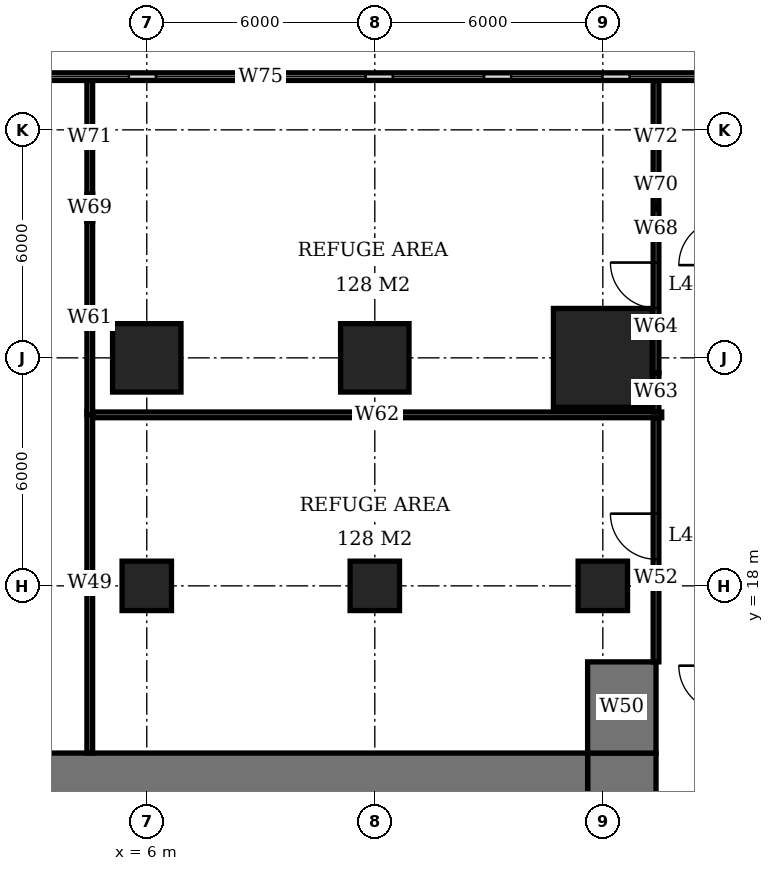
"""IFC4 building model, lengths in metres.
Left out: names, types, materials, properties, quantities, classifications, styles, units other than length and angle.
Written with IfcOpenShell. Run it as: python <this file> out.ifc"""

import sys

from ifc_helpers import new_model, si_unit, direction, frame, frame_2d, origin, origin_2d, place, context, subcontext, project, spatial, rectangle, extrude, element, fill, save


model = new_model("IFC4")
c1 = context("Model", 3, precision=1e-05, world=origin(), true_north=direction((0.0, 1.0)))
c2 = subcontext(c1, "Body", "Model", "MODEL_VIEW")
j1 = project(units=[si_unit("LENGTHUNIT", "METRE"), si_unit("PLANEANGLEUNIT", "RADIAN")], contexts=[c1])
p1 = place(None, origin())
s1 = spatial("IfcSite", under=j1, at=p1, CompositionType="ELEMENT")
p2 = place(p1, origin())
s2 = spatial("IfcBuilding", under=s1, at=p2, CompositionType="ELEMENT")
p3 = place(p2, frame((0.0, 0.0, 164.0)))
s3 = spatial("IfcBuildingStorey", under=s2, at=p3, CompositionType="ELEMENT", Elevation=164.0)
p4 = place(p3, frame((6.0, 18.0, 0.0), z_axis=(0.0, 0.0, 1.0), x_axis=(1.0, 0.0, 0.0)))
e1 = element("IfcColumn", 1, at=p4, inside=s3, PredefinedType="COLUMN", context=c2, shape_type="SweptSolid", body=[
    extrude(rectangle(XDim=1.3, YDim=1.3, at=origin_2d()), origin(), (0.0, 0.0, 1.0), 5.4),
])
p5 = place(p3, frame((6.0, 24.0, 0.0), z_axis=(0.0, 0.0, 1.0), x_axis=(1.0, 0.0, 0.0)))
e2 = element("IfcColumn", 2, at=p5, inside=s3, PredefinedType="COLUMN", context=c2, shape_type="SweptSolid", body=[
    extrude(rectangle(XDim=1.8, YDim=1.8, at=origin_2d()), origin(), (0.0, 0.0, 1.0), 5.4),
])
p6 = place(p3, frame((12.0, 18.0, 0.0), z_axis=(0.0, 0.0, 1.0), x_axis=(1.0, 0.0, 0.0)))
e3 = element("IfcColumn", 3, at=p6, inside=s3, PredefinedType="COLUMN", context=c2, shape_type="SweptSolid", body=[
    extrude(rectangle(XDim=1.3, YDim=1.3, at=origin_2d()), origin(), (0.0, 0.0, 1.0), 5.4),
])
p7 = place(p3, frame((12.0, 24.0, 0.0), z_axis=(0.0, 0.0, 1.0), x_axis=(1.0, 0.0, 0.0)))
e4 = element("IfcColumn", 4, at=p7, inside=s3, PredefinedType="COLUMN", context=c2, shape_type="SweptSolid", body=[
    extrude(rectangle(XDim=1.8, YDim=1.8, at=origin_2d()), origin(), (0.0, 0.0, 1.0), 5.4),
])
p8 = place(p3, frame((18.0, 18.0, 0.0), z_axis=(0.0, 0.0, 1.0), x_axis=(1.0, 0.0, 0.0)))
e5 = element("IfcColumn", 5, at=p8, inside=s3, PredefinedType="COLUMN", context=c2, shape_type="SweptSolid", body=[
    extrude(rectangle(XDim=1.3, YDim=1.3, at=origin_2d()), origin(), (0.0, 0.0, 1.0), 5.4),
])
p9 = place(p3, frame((18.0, 24.0, 0.0), z_axis=(0.0, 0.0, 1.0), x_axis=(1.0, 0.0, 0.0)))
e6 = element("IfcColumn", 6, at=p9, inside=s3, PredefinedType="COLUMN", context=c2, shape_type="SweptSolid", body=[
    extrude(rectangle(XDim=2.6, YDim=2.6, at=origin_2d()), origin(), (0.0, 0.0, 1.0), 5.4),
])
p10 = place(p3, frame((-5.6, 12.6, 0.0), z_axis=(0.0, 0.0, 1.0), x_axis=(1.0, 0.0, 0.0)))
e7 = element("IfcWall", 7, at=p10, inside=s3, PredefinedType="SHEAR", context=c2, shape_type="SweptSolid", body=[
    extrude(rectangle(XDim=23.2, YDim=2.0, at=frame_2d((11.6, 0.0))), origin(), (0.0, 0.0, 1.0), 5.4),
])
p11 = place(p3, frame((18.5, -7.6, 0.0), z_axis=(0.0, 0.0, 1.0), x_axis=(0.0, 1.0, 0.0)))
e8 = element("IfcWall", 8, at=p11, inside=s3, PredefinedType="SHEAR", context=c2, shape_type="SweptSolid", body=[
    extrude(rectangle(XDim=21.2, YDim=1.8, at=frame_2d((10.6, 0.0))), origin(), (0.0, 0.0, 1.0), 5.4),
])
p12 = place(p11, frame((9.2, 0.0, 0.0)))
e9 = element("IfcOpeningElement", 9, at=p12, cuts=e8, PredefinedType="OPENING", context=c2, shape_type="SweptSolid", body=[
    extrude(rectangle(XDim=1.8, YDim=2.4, at=frame_2d((0.9, 1.2))), frame((0.0, 0.91, 0.0), z_axis=(0.0, -1.0, 0.0), x_axis=(1.0, 0.0, 0.0)), (0.0, 0.0, 1.0), 1.82),
])
p13 = place(p3, frame((18.5, 13.6, 0.0), z_axis=(0.0, 0.0, 1.0), x_axis=(0.0, 1.0, 0.0)))
e10 = element("IfcWall", 10, at=p13, inside=s3, PredefinedType="SHEAR", context=c2, shape_type="SweptSolid", body=[
    extrude(rectangle(XDim=2.4, YDim=1.8, at=frame_2d((1.2, 0.0))), origin(), (0.0, 0.0, 1.0), 5.4),
])
p14 = place(p3, frame((24.58, 31.4, 0.0), z_axis=(0.0, 0.0, 1.0), x_axis=(-1.0, 0.0, 0.0)))
e11 = element("IfcWall", 11, at=p14, inside=s3, PredefinedType="USERDEFINED", context=c2, shape_type="SweptSolid", body=[
    extrude(rectangle(XDim=31.16, YDim=0.2, at=frame_2d((15.58, 0.0))), origin(), (0.0, 0.0, 1.0), 5.4),
])
p15 = place(p14, frame((0.358, 0.0, 0.6)))
e12 = element("IfcOpeningElement", 12, at=p15, cuts=e11, PredefinedType="OPENING", context=c2, shape_type="SweptSolid", body=[
    extrude(rectangle(XDim=2.4, YDim=3.0, at=frame_2d((1.2, 1.5))), frame((0.0, 0.11, 0.0), z_axis=(0.0, -1.0, 0.0), x_axis=(1.0, 0.0, 0.0)), (0.0, 0.0, 1.0), 0.22),
])
p16 = place(p14, frame((3.474, 0.0, 0.6)))
e13 = element("IfcOpeningElement", 13, at=p16, cuts=e11, PredefinedType="OPENING", context=c2, shape_type="SweptSolid", body=[
    extrude(rectangle(XDim=2.4, YDim=3.0, at=frame_2d((1.2, 1.5))), frame((0.0, 0.11, 0.0), z_axis=(0.0, -1.0, 0.0), x_axis=(1.0, 0.0, 0.0)), (0.0, 0.0, 1.0), 0.22),
])
p17 = place(p14, frame((6.59, 0.0, 0.6)))
e14 = element("IfcOpeningElement", 14, at=p17, cuts=e11, PredefinedType="OPENING", context=c2, shape_type="SweptSolid", body=[
    extrude(rectangle(XDim=2.4, YDim=3.0, at=frame_2d((1.2, 1.5))), frame((0.0, 0.11, 0.0), z_axis=(0.0, -1.0, 0.0), x_axis=(1.0, 0.0, 0.0)), (0.0, 0.0, 1.0), 0.22),
])
p18 = place(p14, frame((9.706, 0.0, 0.6)))
e15 = element("IfcOpeningElement", 15, at=p18, cuts=e11, PredefinedType="OPENING", context=c2, shape_type="SweptSolid", body=[
    extrude(rectangle(XDim=2.4, YDim=3.0, at=frame_2d((1.2, 1.5))), frame((0.0, 0.11, 0.0), z_axis=(0.0, -1.0, 0.0), x_axis=(1.0, 0.0, 0.0)), (0.0, 0.0, 1.0), 0.22),
])
p19 = place(p14, frame((12.822, 0.0, 0.6)))
e16 = element("IfcOpeningElement", 16, at=p19, cuts=e11, PredefinedType="OPENING", context=c2, shape_type="SweptSolid", body=[
    extrude(rectangle(XDim=2.4, YDim=3.0, at=frame_2d((1.2, 1.5))), frame((0.0, 0.11, 0.0), z_axis=(0.0, -1.0, 0.0), x_axis=(1.0, 0.0, 0.0)), (0.0, 0.0, 1.0), 0.22),
])
p20 = place(p14, frame((15.938, 0.0, 0.6)))
e17 = element("IfcOpeningElement", 17, at=p20, cuts=e11, PredefinedType="OPENING", context=c2, shape_type="SweptSolid", body=[
    extrude(rectangle(XDim=2.4, YDim=3.0, at=frame_2d((1.2, 1.5))), frame((0.0, 0.11, 0.0), z_axis=(0.0, -1.0, 0.0), x_axis=(1.0, 0.0, 0.0)), (0.0, 0.0, 1.0), 0.22),
])
p21 = place(p14, frame((19.054, 0.0, 0.6)))
e18 = element("IfcOpeningElement", 18, at=p21, cuts=e11, PredefinedType="OPENING", context=c2, shape_type="SweptSolid", body=[
    extrude(rectangle(XDim=2.4, YDim=3.0, at=frame_2d((1.2, 1.5))), frame((0.0, 0.11, 0.0), z_axis=(0.0, -1.0, 0.0), x_axis=(1.0, 0.0, 0.0)), (0.0, 0.0, 1.0), 0.22),
])
p22 = place(p14, frame((22.17, 0.0, 0.6)))
e19 = element("IfcOpeningElement", 19, at=p22, cuts=e11, PredefinedType="OPENING", context=c2, shape_type="SweptSolid", body=[
    extrude(rectangle(XDim=2.4, YDim=3.0, at=frame_2d((1.2, 1.5))), frame((0.0, 0.11, 0.0), z_axis=(0.0, -1.0, 0.0), x_axis=(1.0, 0.0, 0.0)), (0.0, 0.0, 1.0), 0.22),
])
p23 = place(p14, frame((25.286, 0.0, 0.6)))
e20 = element("IfcOpeningElement", 20, at=p23, cuts=e11, PredefinedType="OPENING", context=c2, shape_type="SweptSolid", body=[
    extrude(rectangle(XDim=2.4, YDim=3.0, at=frame_2d((1.2, 1.5))), frame((0.0, 0.11, 0.0), z_axis=(0.0, -1.0, 0.0), x_axis=(1.0, 0.0, 0.0)), (0.0, 0.0, 1.0), 0.22),
])
p24 = place(p14, frame((28.402, 0.0, 0.6)))
e21 = element("IfcOpeningElement", 21, at=p24, cuts=e11, PredefinedType="OPENING", context=c2, shape_type="SweptSolid", body=[
    extrude(rectangle(XDim=2.4, YDim=3.0, at=frame_2d((1.2, 1.5))), frame((0.0, 0.11, 0.0), z_axis=(0.0, -1.0, 0.0), x_axis=(1.0, 0.0, 0.0)), (0.0, 0.0, 1.0), 0.22),
])
p25 = place(p3, frame((4.5, 13.6, 0.0), z_axis=(0.0, 0.0, 1.0), x_axis=(0.0, 1.0, 0.0)))
e22 = element("IfcWall", 22, at=p25, inside=s3, PredefinedType="PARTITIONING", context=c2, shape_type="SweptSolid", body=[
    extrude(rectangle(XDim=8.975, YDim=0.15, at=frame_2d((4.487, 0.0))), origin(), (0.0, 0.0, 1.0), 5.15),
])
p26 = place(p3, frame((4.5, 22.5, 0.0), z_axis=(0.0, 0.0, 1.0), x_axis=(0.0, 1.0, 0.0)))
e23 = element("IfcWall", 23, at=p26, inside=s3, PredefinedType="PARTITIONING", context=c2, shape_type="SweptSolid", body=[
    extrude(rectangle(XDim=5.09, YDim=0.15, at=frame_2d((2.545, 0.0))), origin(), (0.0, 0.0, 1.0), 5.15),
])
p27 = place(p3, frame((4.5, 27.59, 0.0), z_axis=(0.0, 0.0, 1.0), x_axis=(0.0, 1.0, 0.0)))
e24 = element("IfcWall", 24, at=p27, inside=s3, PredefinedType="PARTITIONING", context=c2, shape_type="SweptSolid", body=[
    extrude(rectangle(XDim=0.72, YDim=0.15, at=frame_2d((0.36, 0.0))), origin(), (0.0, 0.0, 1.0), 4.15),
])
p28 = place(p3, frame((4.5, 28.31, 0.0), z_axis=(0.0, 0.0, 1.0), x_axis=(0.0, 1.0, 0.0)))
e25 = element("IfcWall", 25, at=p28, inside=s3, PredefinedType="PARTITIONING", context=c2, shape_type="SweptSolid", body=[
    extrude(rectangle(XDim=2.99, YDim=0.15, at=frame_2d((1.495, 0.0))), origin(), (0.0, 0.0, 1.0), 5.15),
])
p29 = place(p3, frame((4.575, 22.5, 0.0), z_axis=(0.0, 0.0, 1.0), x_axis=(1.0, 0.0, 0.0)))
e26 = element("IfcWall", 26, at=p29, inside=s3, PredefinedType="PARTITIONING", context=c2, shape_type="SweptSolid", body=[
    extrude(rectangle(XDim=14.975, YDim=0.15, at=frame_2d((7.488, 0.0))), origin(), (0.0, 0.0, 1.0), 5.15),
])
p30 = place(p3, frame((19.4, 16.0, 0.0), z_axis=(0.0, 0.0, 1.0), x_axis=(0.0, 1.0, 0.0)))
e27 = element("IfcWall", 27, at=p30, inside=s3, PredefinedType="PARTITIONING", context=c2, shape_type="SweptSolid", body=[
    extrude(rectangle(XDim=6.425, YDim=0.15, at=frame_2d((3.212, 0.0))), origin(), (0.0, 0.0, 1.0), 5.15),
])
p31 = place(p30, frame((2.7, 0.0, 0.0)))
e28 = element("IfcOpeningElement", 28, at=p31, cuts=e27, PredefinedType="OPENING", context=c2, shape_type="SweptSolid", body=[
    extrude(rectangle(XDim=1.2, YDim=2.4, at=frame_2d((0.6, 1.2))), frame((0.0, 0.085, 0.0), z_axis=(0.0, -1.0, 0.0), x_axis=(1.0, 0.0, 0.0)), (0.0, 0.0, 1.0), 0.17),
])
p32 = place(p3, frame((19.4, 22.575, 0.0), z_axis=(0.0, 0.0, 1.0), x_axis=(0.0, 1.0, 0.0)))
e29 = element("IfcWall", 29, at=p32, inside=s3, PredefinedType="PARTITIONING", context=c2, shape_type="SweptSolid", body=[
    extrude(rectangle(XDim=1.033, YDim=0.15, at=frame_2d((0.517, 0.0))), origin(), (0.0, 0.0, 1.0), 5.15),
])
p33 = place(p3, frame((19.4, 23.608, 0.0), z_axis=(0.0, 0.0, 1.0), x_axis=(0.0, 1.0, 0.0)))
e30 = element("IfcWall", 30, at=p33, inside=s3, PredefinedType="PARTITIONING", context=c2, shape_type="SweptSolid", body=[
    extrude(rectangle(XDim=3.584, YDim=0.15, at=frame_2d((1.792, 0.0))), origin(), (0.0, 0.0, 1.0), 4.15),
])
p34 = place(p33, frame((1.7, 0.0, 0.0)))
e31 = element("IfcOpeningElement", 31, at=p34, cuts=e30, PredefinedType="OPENING", context=c2, shape_type="SweptSolid", body=[
    extrude(rectangle(XDim=1.2, YDim=2.4, at=frame_2d((0.6, 1.2))), frame((0.0, 0.085, 0.0), z_axis=(0.0, -1.0, 0.0), x_axis=(1.0, 0.0, 0.0)), (0.0, 0.0, 1.0), 0.17),
])
p35 = place(p3, frame((19.4, 27.192, 0.0), z_axis=(0.0, 0.0, 1.0), x_axis=(0.0, 1.0, 0.0)))
e32 = element("IfcWall", 32, at=p35, inside=s3, PredefinedType="PARTITIONING", context=c2, shape_type="SweptSolid", body=[
    extrude(rectangle(XDim=0.398, YDim=0.15, at=frame_2d((0.199, 0.0))), origin(), (0.0, 0.0, 1.0), 5.15),
])
p36 = place(p3, frame((19.4, 27.59, 0.0), z_axis=(0.0, 0.0, 1.0), x_axis=(0.0, 1.0, 0.0)))
e33 = element("IfcWall", 33, at=p36, inside=s3, PredefinedType="PARTITIONING", context=c2, shape_type="SweptSolid", body=[
    extrude(rectangle(XDim=0.72, YDim=0.15, at=frame_2d((0.36, 0.0))), origin(), (0.0, 0.0, 1.0), 4.15),
])
p37 = place(p3, frame((19.4, 28.31, 0.0), z_axis=(0.0, 0.0, 1.0), x_axis=(0.0, 1.0, 0.0)))
e34 = element("IfcWall", 34, at=p37, inside=s3, PredefinedType="PARTITIONING", context=c2, shape_type="SweptSolid", body=[
    extrude(rectangle(XDim=2.99, YDim=0.15, at=frame_2d((1.495, 0.0))), origin(), (0.0, 0.0, 1.0), 5.15),
])
p38 = place(p16, origin())
e35 = element("IfcWindow", 35, at=p38, inside=s3, PartitioningType="SINGLE_PANEL", PredefinedType="USERDEFINED", context=c2, shape_type="SweptSolid", body=[
    extrude(rectangle(XDim=2.4, YDim=3.0, at=frame_2d((1.2, 1.5))), frame((0.0, 0.03, 0.0), z_axis=(0.0, -1.0, 0.0), x_axis=(1.0, 0.0, 0.0)), (0.0, 0.0, 1.0), 0.06),
])
fill(e13, e35)
p39 = place(p17, origin())
e36 = element("IfcWindow", 36, at=p39, inside=s3, PartitioningType="SINGLE_PANEL", PredefinedType="USERDEFINED", context=c2, shape_type="SweptSolid", body=[
    extrude(rectangle(XDim=2.4, YDim=3.0, at=frame_2d((1.2, 1.5))), frame((0.0, 0.03, 0.0), z_axis=(0.0, -1.0, 0.0), x_axis=(1.0, 0.0, 0.0)), (0.0, 0.0, 1.0), 0.06),
])
fill(e14, e36)
p40 = place(p18, origin())
e37 = element("IfcWindow", 37, at=p40, inside=s3, PartitioningType="SINGLE_PANEL", PredefinedType="USERDEFINED", context=c2, shape_type="SweptSolid", body=[
    extrude(rectangle(XDim=2.4, YDim=3.0, at=frame_2d((1.2, 1.5))), frame((0.0, 0.03, 0.0), z_axis=(0.0, -1.0, 0.0), x_axis=(1.0, 0.0, 0.0)), (0.0, 0.0, 1.0), 0.06),
])
fill(e15, e37)
p41 = place(p19, origin())
e38 = element("IfcWindow", 38, at=p41, inside=s3, PartitioningType="SINGLE_PANEL", PredefinedType="USERDEFINED", context=c2, shape_type="SweptSolid", body=[
    extrude(rectangle(XDim=2.4, YDim=3.0, at=frame_2d((1.2, 1.5))), frame((0.0, 0.03, 0.0), z_axis=(0.0, -1.0, 0.0), x_axis=(1.0, 0.0, 0.0)), (0.0, 0.0, 1.0), 0.06),
])
fill(e16, e38)
p42 = place(p20, origin())
e39 = element("IfcWindow", 39, at=p42, inside=s3, PartitioningType="SINGLE_PANEL", PredefinedType="USERDEFINED", context=c2, shape_type="SweptSolid", body=[
    extrude(rectangle(XDim=2.4, YDim=3.0, at=frame_2d((1.2, 1.5))), frame((0.0, 0.03, 0.0), z_axis=(0.0, -1.0, 0.0), x_axis=(1.0, 0.0, 0.0)), (0.0, 0.0, 1.0), 0.06),
])
fill(e17, e39)
p43 = place(p21, origin())
e40 = element("IfcWindow", 40, at=p43, inside=s3, PartitioningType="SINGLE_PANEL", PredefinedType="USERDEFINED", context=c2, shape_type="SweptSolid", body=[
    extrude(rectangle(XDim=2.4, YDim=3.0, at=frame_2d((1.2, 1.5))), frame((0.0, 0.03, 0.0), z_axis=(0.0, -1.0, 0.0), x_axis=(1.0, 0.0, 0.0)), (0.0, 0.0, 1.0), 0.06),
])
fill(e18, e40)
p44 = place(p31, origin())
e41 = element("IfcDoor", 41, at=p44, inside=s3, OperationType="SINGLE_SWING_RIGHT", PredefinedType="DOOR", context=c2, shape_type="SweptSolid", body=[
    extrude(rectangle(XDim=1.2, YDim=2.4, at=frame_2d((0.6, 1.2))), frame((0.0, 0.025, 0.0), z_axis=(0.0, -1.0, 0.0), x_axis=(1.0, 0.0, 0.0)), (0.0, 0.0, 1.0), 0.05),
])
fill(e28, e41)
p45 = place(p34, origin())
e42 = element("IfcDoor", 42, at=p45, inside=s3, OperationType="SINGLE_SWING_RIGHT", PredefinedType="DOOR", context=c2, shape_type="SweptSolid", body=[
    extrude(rectangle(XDim=1.2, YDim=2.4, at=frame_2d((0.6, 1.2))), frame((0.0, 0.025, 0.0), z_axis=(0.0, -1.0, 0.0), x_axis=(1.0, 0.0, 0.0)), (0.0, 0.0, 1.0), 0.05),
])
fill(e31, e42)
save(model, sys.argv[1])
